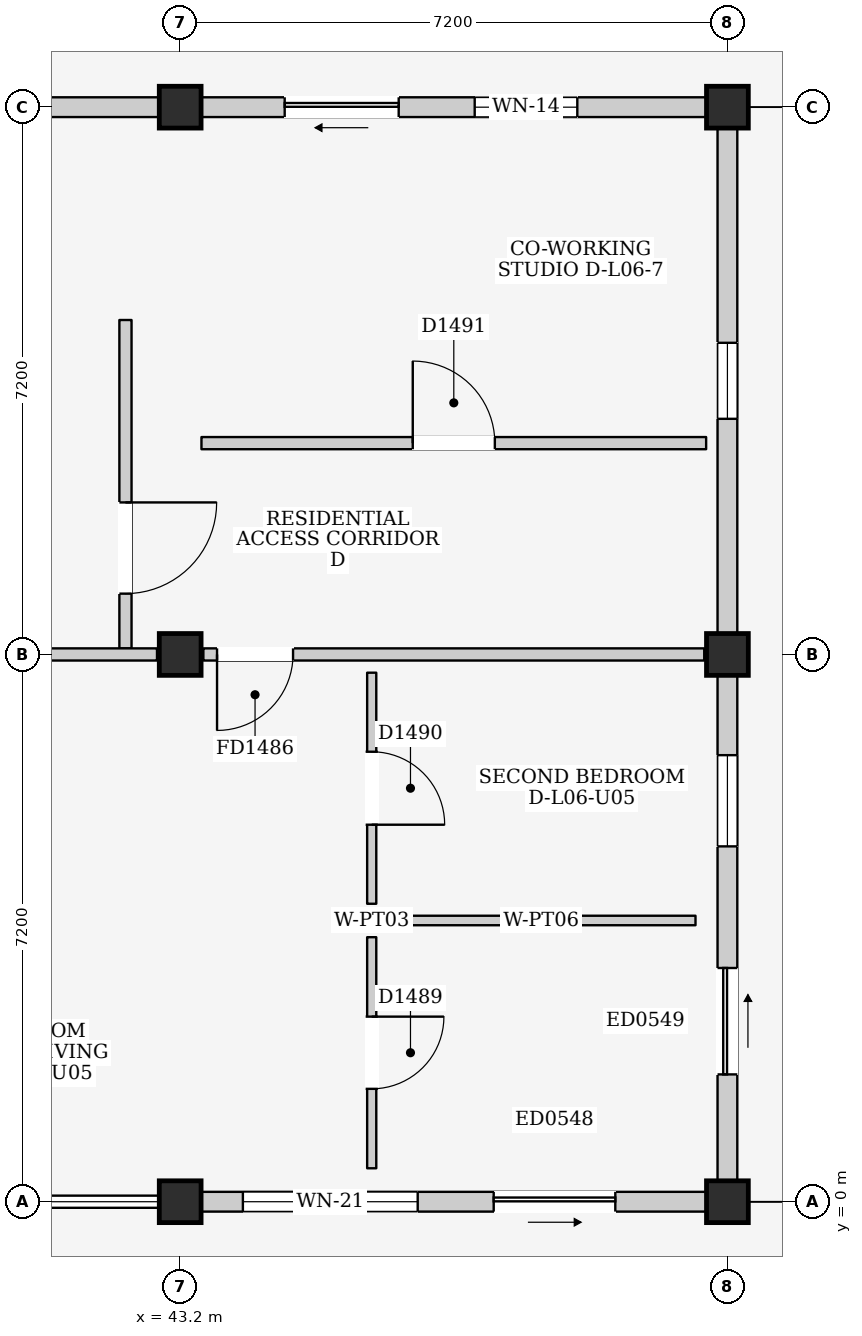
"""IFC4 building model, lengths in metres.
Left out: names, types, materials, properties, quantities, classifications, styles, units other than length and angle.
Written with IfcOpenShell. Run it as: python <this file> out.ifc"""

import sys

from ifc_helpers import new_model, si_unit, direction, frame, frame_2d, origin, origin_2d, place, context, subcontext, project, spatial, rectangle, extrude, element, fill, save


model = new_model("IFC4")
c1 = context("Model", 3, precision=1e-05, world=origin(), true_north=direction((0.0, 1.0)))
c2 = subcontext(c1, "Body", "Model", "MODEL_VIEW")
j1 = project(units=[si_unit("LENGTHUNIT", "METRE"), si_unit("PLANEANGLEUNIT", "RADIAN")], contexts=[c1])
p1 = place(None, origin())
s1 = spatial("IfcSite", under=j1, at=p1, CompositionType="ELEMENT")
p2 = place(p1, origin())
s2 = spatial("IfcBuilding", under=s1, at=p2, CompositionType="ELEMENT")
p3 = place(p2, frame((0.0, 0.0, 21.9)))
s3 = spatial("IfcBuildingStorey", under=s2, at=p3, CompositionType="ELEMENT", Elevation=21.9)
for number, where, z_axis, x_axis in (
    (1, (43.2, 0.0, 0.0), (0.0, 0.0, 1.0), (1.0, 0.0, 0.0)),
    (2, (43.2, 7.2, 0.0), (0.0, 0.0, 1.0), (1.0, 0.0, 0.0)),
    (3, (43.2, 14.4, 0.0), (0.0, 0.0, 1.0), (1.0, 0.0, 0.0)),
    (4, (50.4, 0.0, 0.0), (0.0, 0.0, 1.0), (1.0, 0.0, 0.0)),
    (5, (50.4, 7.2, 0.0), (0.0, 0.0, 1.0), (1.0, 0.0, 0.0)),
    (6, (50.4, 14.4, 0.0), (0.0, 0.0, 1.0), (1.0, 0.0, 0.0)),
):
    element("IfcColumn", number, at=place(p3, frame(where, z_axis=z_axis, x_axis=x_axis)), inside=s3, PredefinedType="COLUMN", context=c2, shape_type="SweptSolid", body=[
        extrude(rectangle(XDim=0.55, YDim=0.55, at=origin_2d()), origin(), (0.0, 0.0, 1.0), 3.2),
    ])
p4 = place(p3, frame((36.275, 14.4, 0.0), z_axis=(0.0, 0.0, 1.0), x_axis=(1.0, 0.0, 0.0)))
e7 = element("IfcWall", 7, at=p4, inside=s3, PredefinedType="ELEMENTEDWALL", context=c2, shape_type="SweptSolid", body=[
    extrude(rectangle(XDim=6.65, YDim=0.26, at=frame_2d((3.325, 0.0))), origin(), (0.0, 0.0, 1.0), 2.365),
])
p5 = place(p4, frame((2.825, 0.0, 1.2)))
e8 = element("IfcOpeningElement", 8, at=p5, cuts=e7, PredefinedType="OPENING", context=c2, shape_type="SweptSolid", body=[
    extrude(rectangle(XDim=1.0, YDim=0.9, at=frame_2d((0.5, 0.45))), frame((0.0, 0.145, 0.0), z_axis=(0.0, -1.0, 0.0), x_axis=(1.0, 0.0, 0.0)), (0.0, 0.0, 1.0), 0.29),
])
p6 = place(p3, frame((43.475, 0.0, 0.0), z_axis=(0.0, 0.0, 1.0), x_axis=(1.0, 0.0, 0.0)))
e9 = element("IfcWall", 9, at=p6, inside=s3, PredefinedType="ELEMENTEDWALL", context=c2, shape_type="SweptSolid", body=[
    extrude(rectangle(XDim=6.65, YDim=0.26, at=frame_2d((3.325, 0.0))), origin(), (0.0, 0.0, 1.0), 2.515),
])
p7 = place(p6, frame((3.85, 0.0, 0.0)))
e10 = element("IfcOpeningElement", 10, at=p7, cuts=e9, PredefinedType="OPENING", context=c2, shape_type="SweptSolid", body=[
    extrude(rectangle(XDim=1.6, YDim=2.12, at=frame_2d((0.8, 1.06))), frame((0.0, 0.145, 0.0), z_axis=(0.0, -1.0, 0.0), x_axis=(1.0, 0.0, 0.0)), (0.0, 0.0, 1.0), 0.29),
])
p8 = place(p6, frame((0.55, 0.0, 0.805)))
e11 = element("IfcOpeningElement", 11, at=p8, cuts=e9, PredefinedType="OPENING", context=c2, shape_type="SweptSolid", body=[
    extrude(rectangle(XDim=2.3, YDim=1.6, at=frame_2d((1.15, 0.8))), frame((0.0, 0.145, 0.0), z_axis=(0.0, -1.0, 0.0), x_axis=(1.0, 0.0, 0.0)), (0.0, 0.0, 1.0), 0.29),
])
p9 = place(p3, frame((50.4, 0.275, 0.0), z_axis=(0.0, 0.0, 1.0), x_axis=(0.0, 1.0, 0.0)))
e12 = element("IfcWall", 12, at=p9, inside=s3, PredefinedType="ELEMENTEDWALL", context=c2, shape_type="SweptSolid", body=[
    extrude(rectangle(XDim=6.65, YDim=0.26, at=frame_2d((3.325, 0.0))), origin(), (0.0, 0.0, 1.0), 2.465),
])
p10 = place(p9, frame((1.4, 0.0, 0.0)))
e13 = element("IfcOpeningElement", 13, at=p10, cuts=e12, PredefinedType="OPENING", context=c2, shape_type="SweptSolid", body=[
    extrude(rectangle(XDim=1.4, YDim=2.1, at=frame_2d((0.7, 1.05))), frame((0.0, 0.145, 0.0), z_axis=(0.0, -1.0, 0.0), x_axis=(1.0, 0.0, 0.0)), (0.0, 0.0, 1.0), 0.29),
])
p11 = place(p9, frame((4.4, 0.0, 0.95)))
e14 = element("IfcOpeningElement", 14, at=p11, cuts=e12, PredefinedType="OPENING", context=c2, shape_type="SweptSolid", body=[
    extrude(rectangle(XDim=1.2, YDim=1.35, at=frame_2d((0.6, 0.675))), frame((0.0, 0.145, 0.0), z_axis=(0.0, -1.0, 0.0), x_axis=(1.0, 0.0, 0.0)), (0.0, 0.0, 1.0), 0.29),
])
p12 = place(p3, frame((43.475, 14.4, 0.0), z_axis=(0.0, 0.0, 1.0), x_axis=(1.0, 0.0, 0.0)))
e15 = element("IfcWall", 15, at=p12, inside=s3, PredefinedType="ELEMENTEDWALL", context=c2, shape_type="SweptSolid", body=[
    extrude(rectangle(XDim=6.65, YDim=0.26, at=frame_2d((3.325, 0.0))), origin(), (0.0, 0.0, 1.0), 2.365),
])
p13 = place(p12, frame((1.1, 0.0, 0.0)))
e16 = element("IfcOpeningElement", 16, at=p13, cuts=e15, PredefinedType="OPENING", context=c2, shape_type="SweptSolid", body=[
    extrude(rectangle(XDim=1.5, YDim=2.12, at=frame_2d((0.75, 1.06))), frame((0.0, 0.145, 0.0), z_axis=(0.0, -1.0, 0.0), x_axis=(1.0, 0.0, 0.0)), (0.0, 0.0, 1.0), 0.29),
])
p14 = place(p12, frame((3.6, 0.0, 0.755)))
e17 = element("IfcOpeningElement", 17, at=p14, cuts=e15, PredefinedType="OPENING", context=c2, shape_type="SweptSolid", body=[
    extrude(rectangle(XDim=1.35, YDim=1.5, at=frame_2d((0.675, 0.75))), frame((0.0, 0.145, 0.0), z_axis=(0.0, -1.0, 0.0), x_axis=(1.0, 0.0, 0.0)), (0.0, 0.0, 1.0), 0.29),
])
p15 = place(p3, frame((50.4, 7.475, 0.0), z_axis=(0.0, 0.0, 1.0), x_axis=(0.0, 1.0, 0.0)))
e18 = element("IfcWall", 18, at=p15, inside=s3, PredefinedType="ELEMENTEDWALL", context=c2, shape_type="SweptSolid", body=[
    extrude(rectangle(XDim=6.65, YDim=0.26, at=frame_2d((3.325, 0.0))), origin(), (0.0, 0.0, 1.0), 2.465),
])
p16 = place(p15, frame((2.825, 0.0, 1.1)))
e19 = element("IfcOpeningElement", 19, at=p16, cuts=e18, PredefinedType="OPENING", context=c2, shape_type="SweptSolid", body=[
    extrude(rectangle(XDim=1.0, YDim=0.9, at=frame_2d((0.5, 0.45))), frame((0.0, 0.145, 0.0), z_axis=(0.0, -1.0, 0.0), x_axis=(1.0, 0.0, 0.0)), (0.0, 0.0, 1.0), 0.29),
])
p17 = place(p3, frame((42.48, 7.28, 0.0), z_axis=(0.0, 0.0, 1.0), x_axis=(0.0, 1.0, 0.0)))
e20 = element("IfcWall", 20, at=p17, inside=s3, PredefinedType="PARTITIONING", context=c2, shape_type="SweptSolid", body=[
    extrude(rectangle(XDim=4.32, YDim=0.16, at=frame_2d((2.16, 0.0))), origin(), (0.0, 0.0, 1.0), 2.98),
])
p18 = place(p17, frame((0.72, 0.0, 0.0)))
e21 = element("IfcOpeningElement", 21, at=p18, cuts=e20, PredefinedType="OPENING", context=c2, shape_type="SweptSolid", body=[
    extrude(rectangle(XDim=1.2, YDim=2.2, at=frame_2d((0.6, 1.1))), frame((0.0, 0.095, 0.0), z_axis=(0.0, -1.0, 0.0), x_axis=(1.0, 0.0, 0.0)), (0.0, 0.0, 1.0), 0.19),
])
p19 = place(p3, frame((36.305, 7.2, 0.0), z_axis=(0.0, 0.0, 1.0), x_axis=(1.0, 0.0, 0.0)))
e22 = element("IfcWall", 22, at=p19, inside=s3, PredefinedType="PARTITIONING", context=c2, shape_type="SweptSolid", body=[
    extrude(rectangle(XDim=6.59, YDim=0.16, at=frame_2d((3.295, 0.0))), origin(), (0.0, 0.0, 1.0), 2.365),
])
p20 = place(p3, frame((43.505, 7.2, 0.0), z_axis=(0.0, 0.0, 1.0), x_axis=(1.0, 0.0, 0.0)))
e23 = element("IfcWall", 23, at=p20, inside=s3, PredefinedType="PARTITIONING", context=c2, shape_type="SweptSolid", body=[
    extrude(rectangle(XDim=6.59, YDim=0.16, at=frame_2d((3.295, 0.0))), origin(), (0.0, 0.0, 1.0), 2.365),
])
p21 = place(p20, frame((0.18, 0.0, 0.0)))
e24 = element("IfcOpeningElement", 24, at=p21, cuts=e23, PredefinedType="OPENING", context=c2, shape_type="SweptSolid", body=[
    extrude(rectangle(XDim=1.0, YDim=2.15, at=frame_2d((0.5, 1.075))), frame((0.0, 0.095, 0.0), z_axis=(0.0, -1.0, 0.0), x_axis=(1.0, 0.0, 0.0)), (0.0, 0.0, 1.0), 0.19),
])
p22 = place(p3, frame((45.72, 0.44, 0.0), z_axis=(0.0, 0.0, 1.0), x_axis=(0.0, 1.0, 0.0)))
e25 = element("IfcWall", 25, at=p22, inside=s3, PredefinedType="PARTITIONING", context=c2, shape_type="SweptSolid", body=[
    extrude(rectangle(XDim=3.04, YDim=0.12, at=frame_2d((1.52, 0.0))), origin(), (0.0, 0.0, 1.0), 2.98),
])
p23 = place(p22, frame((1.045, 0.0, 0.0)))
e26 = element("IfcOpeningElement", 26, at=p23, cuts=e25, PredefinedType="OPENING", context=c2, shape_type="SweptSolid", body=[
    extrude(rectangle(XDim=0.95, YDim=2.15, at=frame_2d((0.475, 1.075))), frame((0.0, 0.075, 0.0), z_axis=(0.0, -1.0, 0.0), x_axis=(1.0, 0.0, 0.0)), (0.0, 0.0, 1.0), 0.15),
])
p24 = place(p3, frame((45.92, 3.7, 0.0), z_axis=(0.0, 0.0, 1.0), x_axis=(1.0, 0.0, 0.0)))
e27 = element("IfcWall", 27, at=p24, inside=s3, PredefinedType="PARTITIONING", context=c2, shape_type="SweptSolid", body=[
    extrude(rectangle(XDim=4.06, YDim=0.125, at=frame_2d((2.03, 0.0))), origin(), (0.0, 0.0, 1.0), 2.98),
])
p25 = place(p3, frame((45.72, 3.92, 0.0), z_axis=(0.0, 0.0, 1.0), x_axis=(0.0, 1.0, 0.0)))
e28 = element("IfcWall", 28, at=p25, inside=s3, PredefinedType="PARTITIONING", context=c2, shape_type="SweptSolid", body=[
    extrude(rectangle(XDim=3.04, YDim=0.12, at=frame_2d((1.52, 0.0))), origin(), (0.0, 0.0, 1.0), 2.98),
])
p26 = place(p25, frame((1.04, 0.0, 0.0)))
e29 = element("IfcOpeningElement", 29, at=p26, cuts=e28, PredefinedType="OPENING", context=c2, shape_type="SweptSolid", body=[
    extrude(rectangle(XDim=0.96, YDim=2.15, at=frame_2d((0.48, 1.075))), frame((0.0, 0.075, 0.0), z_axis=(0.0, -1.0, 0.0), x_axis=(1.0, 0.0, 0.0)), (0.0, 0.0, 1.0), 0.15),
])
p27 = place(p3, frame((43.48, 9.98, 0.0), z_axis=(0.0, 0.0, 1.0), x_axis=(1.0, 0.0, 0.0)))
e30 = element("IfcWall", 30, at=p27, inside=s3, PredefinedType="PARTITIONING", context=c2, shape_type="SweptSolid", body=[
    extrude(rectangle(XDim=6.64, YDim=0.16, at=frame_2d((3.32, 0.0))), origin(), (0.0, 0.0, 1.0), 2.98),
])
p28 = place(p27, frame((2.78, 0.0, 0.0)))
e31 = element("IfcOpeningElement", 31, at=p28, cuts=e30, PredefinedType="OPENING", context=c2, shape_type="SweptSolid", body=[
    extrude(rectangle(XDim=1.08, YDim=2.22, at=frame_2d((0.54, 1.11))), frame((0.0, 0.095, 0.0), z_axis=(0.0, -1.0, 0.0), x_axis=(1.0, 0.0, 0.0)), (0.0, 0.0, 1.0), 0.19),
])
p29 = place(p7, frame((1.6, 0.0, 0.0), z_axis=(0.0, 0.0, 1.0), x_axis=(-1.0, 0.0, 0.0)))
e32 = element("IfcDoor", 32, at=p29, inside=s3, OperationType="SLIDING_TO_RIGHT", PredefinedType="DOOR", context=c2, shape_type="SweptSolid", body=[
    extrude(rectangle(XDim=1.6, YDim=2.12, at=frame_2d((0.8, 1.06))), frame((0.0, 0.025, 0.0), z_axis=(0.0, -1.0, 0.0), x_axis=(1.0, 0.0, 0.0)), (0.0, 0.0, 1.0), 0.05),
])
fill(e10, e32)
p30 = place(p8, origin())
e33 = element("IfcWindow", 33, at=p30, inside=s3, PartitioningType="TRIPLE_PANEL_VERTICAL", PredefinedType="WINDOW", context=c2, shape_type="SweptSolid", body=[
    extrude(rectangle(XDim=2.3, YDim=1.6, at=frame_2d((1.15, 0.8))), frame((0.0, 0.03, 0.0), z_axis=(0.0, -1.0, 0.0), x_axis=(1.0, 0.0, 0.0)), (0.0, 0.0, 1.0), 0.06),
])
fill(e11, e33)
p31 = place(p10, frame((1.4, 0.0, 0.0), z_axis=(0.0, 0.0, 1.0), x_axis=(-1.0, 0.0, 0.0)))
e34 = element("IfcDoor", 34, at=p31, inside=s3, OperationType="SLIDING_TO_RIGHT", PredefinedType="DOOR", context=c2, shape_type="SweptSolid", body=[
    extrude(rectangle(XDim=1.4, YDim=2.1, at=frame_2d((0.7, 1.05))), frame((0.0, 0.025, 0.0), z_axis=(0.0, -1.0, 0.0), x_axis=(1.0, 0.0, 0.0)), (0.0, 0.0, 1.0), 0.05),
])
fill(e13, e34)
p32 = place(p11, origin())
e35 = element("IfcWindow", 35, at=p32, inside=s3, PartitioningType="SINGLE_PANEL", PredefinedType="WINDOW", context=c2, shape_type="SweptSolid", body=[
    extrude(rectangle(XDim=1.2, YDim=1.35, at=frame_2d((0.6, 0.675))), frame((0.0, 0.03, 0.0), z_axis=(0.0, -1.0, 0.0), x_axis=(1.0, 0.0, 0.0)), (0.0, 0.0, 1.0), 0.06),
])
fill(e14, e35)
p33 = place(p13, frame((1.5, 0.0, 0.0), z_axis=(0.0, 0.0, 1.0), x_axis=(-1.0, 0.0, 0.0)))
e36 = element("IfcDoor", 36, at=p33, inside=s3, OperationType="SLIDING_TO_LEFT", PredefinedType="DOOR", context=c2, shape_type="SweptSolid", body=[
    extrude(rectangle(XDim=1.5, YDim=2.12, at=frame_2d((0.75, 1.06))), frame((0.0, 0.025, 0.0), z_axis=(0.0, -1.0, 0.0), x_axis=(1.0, 0.0, 0.0)), (0.0, 0.0, 1.0), 0.05),
])
fill(e16, e36)
p34 = place(p14, origin())
e37 = element("IfcWindow", 37, at=p34, inside=s3, PartitioningType="SINGLE_PANEL", PredefinedType="WINDOW", context=c2, shape_type="SweptSolid", body=[
    extrude(rectangle(XDim=1.35, YDim=1.5, at=frame_2d((0.675, 0.75))), frame((0.0, 0.03, 0.0), z_axis=(0.0, -1.0, 0.0), x_axis=(1.0, 0.0, 0.0)), (0.0, 0.0, 1.0), 0.06),
])
fill(e17, e37)
p35 = place(p16, origin())
e38 = element("IfcWindow", 38, at=p35, inside=s3, PartitioningType="SINGLE_PANEL", PredefinedType="WINDOW", context=c2, shape_type="SweptSolid", body=[
    extrude(rectangle(XDim=1.0, YDim=0.9, at=frame_2d((0.5, 0.45))), frame((0.0, 0.03, 0.0), z_axis=(0.0, -1.0, 0.0), x_axis=(1.0, 0.0, 0.0)), (0.0, 0.0, 1.0), 0.06),
])
fill(e19, e38)
p36 = place(p18, frame((1.2, 0.0, 0.0), z_axis=(0.0, 0.0, 1.0), x_axis=(-1.0, 0.0, 0.0)))
e39 = element("IfcDoor", 39, at=p36, inside=s3, OperationType="SINGLE_SWING_LEFT", PredefinedType="DOOR", context=c2, shape_type="SweptSolid", body=[
    extrude(rectangle(XDim=1.2, YDim=2.2, at=frame_2d((0.6, 1.1))), frame((0.0, 0.025, 0.0), z_axis=(0.0, -1.0, 0.0), x_axis=(1.0, 0.0, 0.0)), (0.0, 0.0, 1.0), 0.05),
])
fill(e21, e39)
p37 = place(p21, frame((1.0, 0.0, 0.0), z_axis=(0.0, 0.0, 1.0), x_axis=(-1.0, 0.0, 0.0)))
e40 = element("IfcDoor", 40, at=p37, inside=s3, OperationType="SINGLE_SWING_RIGHT", PredefinedType="DOOR", context=c2, shape_type="SweptSolid", body=[
    extrude(rectangle(XDim=1.0, YDim=2.15, at=frame_2d((0.5, 1.075))), frame((0.0, 0.025, 0.0), z_axis=(0.0, -1.0, 0.0), x_axis=(1.0, 0.0, 0.0)), (0.0, 0.0, 1.0), 0.05),
])
fill(e24, e40)
p38 = place(p23, frame((0.95, 0.0, 0.0), z_axis=(0.0, 0.0, 1.0), x_axis=(-1.0, 0.0, 0.0)))
e41 = element("IfcDoor", 41, at=p38, inside=s3, OperationType="SINGLE_SWING_LEFT", PredefinedType="DOOR", context=c2, shape_type="SweptSolid", body=[
    extrude(rectangle(XDim=0.95, YDim=2.15, at=frame_2d((0.475, 1.075))), frame((0.0, 0.025, 0.0), z_axis=(0.0, -1.0, 0.0), x_axis=(1.0, 0.0, 0.0)), (0.0, 0.0, 1.0), 0.05),
])
fill(e26, e41)
p39 = place(p26, frame((0.96, 0.0, 0.0), z_axis=(0.0, 0.0, 1.0), x_axis=(-1.0, 0.0, 0.0)))
e42 = element("IfcDoor", 42, at=p39, inside=s3, OperationType="SINGLE_SWING_RIGHT", PredefinedType="DOOR", context=c2, shape_type="SweptSolid", body=[
    extrude(rectangle(XDim=0.96, YDim=2.15, at=frame_2d((0.48, 1.075))), frame((0.0, 0.025, 0.0), z_axis=(0.0, -1.0, 0.0), x_axis=(1.0, 0.0, 0.0)), (0.0, 0.0, 1.0), 0.05),
])
fill(e29, e42)
p40 = place(p28, origin())
e43 = element("IfcDoor", 43, at=p40, inside=s3, OperationType="SINGLE_SWING_LEFT", PredefinedType="DOOR", context=c2, shape_type="SweptSolid", body=[
    extrude(rectangle(XDim=1.08, YDim=2.22, at=frame_2d((0.54, 1.11))), frame((0.0, 0.025, 0.0), z_axis=(0.0, -1.0, 0.0), x_axis=(1.0, 0.0, 0.0)), (0.0, 0.0, 1.0), 0.05),
])
fill(e31, e43)
save(model, sys.argv[1])
